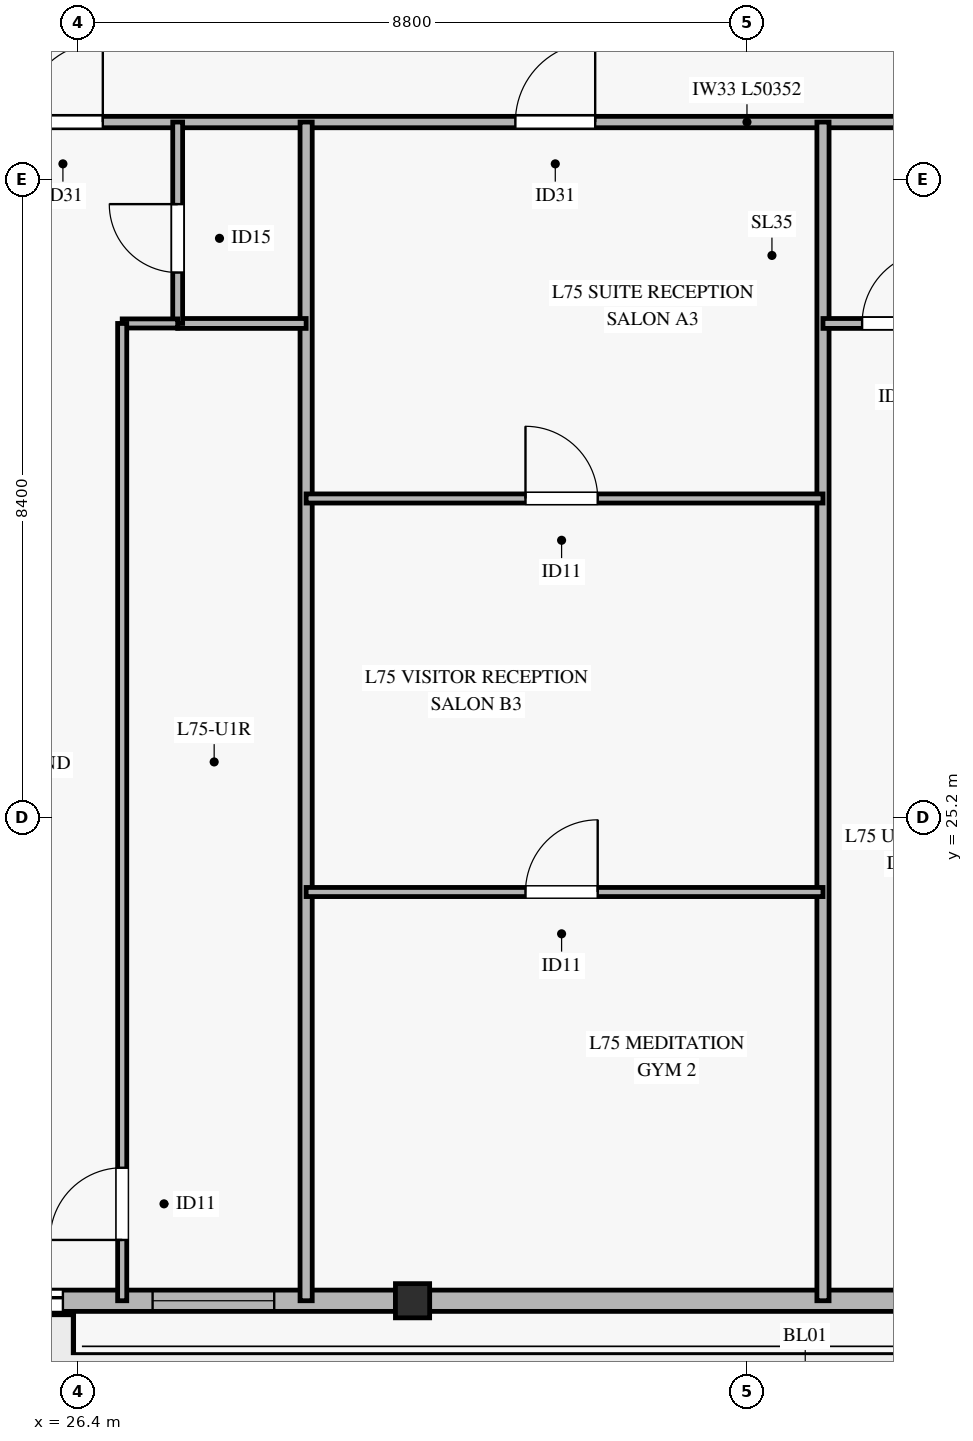
"""IFC4 building model, lengths in metres.
Left out: names, types, materials, properties, quantities, classifications, styles, units other than length and angle.
Written with IfcOpenShell. Run it as: python <this file> out.ifc"""

import sys

from ifc_helpers import new_model, si_unit, direction, frame, frame_2d, origin, origin_2d, place, context, subcontext, project, spatial, rectangle, hollow_rectangle, extrude, source, transform, mapped, element, fill, save


model = new_model("IFC4")
c1 = context("Model", 3, precision=1e-05, world=origin(), true_north=direction((0.0, 1.0)))
c2 = subcontext(c1, "Body", "Model", "MODEL_VIEW")
j1 = project(units=[si_unit("LENGTHUNIT", "METRE"), si_unit("PLANEANGLEUNIT", "RADIAN")], contexts=[c1])
p1 = place(None, origin())
s1 = spatial("IfcSite", under=j1, at=p1, CompositionType="ELEMENT")
p2 = place(p1, origin())
s2 = spatial("IfcBuilding", under=s1, at=p2, CompositionType="ELEMENT")
p3 = place(p2, frame((0.0, 0.0, 293.8)))
s3 = spatial("IfcBuildingStorey", under=s2, at=p3, CompositionType="ELEMENT", Elevation=293.8)
m1 = source(origin(), c2, "Body", "SweptSolid", [
    extrude(hollow_rectangle(XDim=0.45, YDim=0.45, WallThickness=0.022, at=origin_2d()), origin(), (0.0, 0.0, 1.0), 3.185),
])
p4 = place(p3, frame((30.8, 18.841, 0.0), z_axis=(0.0, 0.0, 1.0), x_axis=(1.0, 0.0, 0.0)))
e1 = element("IfcColumn", 1, at=p4, inside=s3, PredefinedType="COLUMN", context=c2, shape_type="MappedRepresentation", body=[
    mapped(m1, transform((0.0, 0.0, 0.0), x_axis=(1.0, 0.0, 0.0), y_axis=(0.0, 1.0, 0.0), z_axis=(0.0, 0.0, 1.0), scale=1.0)),
])
p5 = place(p3, frame((20.075, 18.841, 0.0), z_axis=(0.0, 0.0, 1.0), x_axis=(1.0, 0.0, 0.0)))
e2 = element("IfcWall", 2, at=p5, inside=s3, PredefinedType="SOLIDWALL", context=c2, shape_type="SweptSolid", body=[
    extrude(rectangle(XDim=10.5, YDim=0.28, at=frame_2d((5.25, 0.0))), origin(), (0.0, 0.0, 1.0), 2.815),
])
p6 = place(p5, frame((4.325, 0.0, 0.0)))
e3 = element("IfcOpeningElement", 3, at=p6, cuts=e2, PredefinedType="OPENING", context=c2, shape_type="SweptSolid", body=[
    extrude(rectangle(XDim=1.8, YDim=2.25, at=frame_2d((0.9, 1.125))), frame((0.0, 0.15, 0.0), z_axis=(0.0, -1.0, 0.0), x_axis=(1.0, 0.0, 0.0)), (0.0, 0.0, 1.0), 0.3),
])
p7 = place(p5, frame((0.517, 0.0, 0.45)))
e4 = element("IfcOpeningElement", 4, at=p7, cuts=e2, PredefinedType="OPENING", context=c2, shape_type="SweptSolid", body=[
    extrude(rectangle(XDim=1.6, YDim=2.0, at=frame_2d((0.8, 1.0))), frame((0.0, 0.15, 0.0), z_axis=(0.0, -1.0, 0.0), x_axis=(1.0, 0.0, 0.0)), (0.0, 0.0, 1.0), 0.3),
])
p8 = place(p5, frame((7.305, 0.0, 0.45)))
e5 = element("IfcOpeningElement", 5, at=p8, cuts=e2, PredefinedType="OPENING", context=c2, shape_type="SweptSolid", body=[
    extrude(rectangle(XDim=1.6, YDim=2.0, at=frame_2d((0.8, 1.0))), frame((0.0, 0.15, 0.0), z_axis=(0.0, -1.0, 0.0), x_axis=(1.0, 0.0, 0.0)), (0.0, 0.0, 1.0), 0.3),
])
p9 = place(p3, frame((31.025, 18.841, 0.0), z_axis=(0.0, 0.0, 1.0), x_axis=(1.0, 0.0, 0.0)))
e6 = element("IfcWall", 6, at=p9, inside=s3, PredefinedType="SOLIDWALL", context=c2, shape_type="SweptSolid", body=[
    extrude(rectangle(XDim=6.3, YDim=0.28, at=frame_2d((3.15, 0.0))), origin(), (0.0, 0.0, 1.0), 2.815),
])
p10 = place(p3, frame((10.024, 34.35, 0.0), z_axis=(0.0, 0.0, 1.0), x_axis=(1.0, 0.0, 0.0)))
e7 = element("IfcWall", 7, at=p10, inside=s3, PredefinedType="PARTITIONING", context=c2, shape_type="SweptSolid", body=[
    extrude(rectangle(XDim=50.352, YDim=0.15, at=frame_2d((25.176, 0.0))), origin(), (0.0, 0.0, 1.0), 2.47),
])
p11 = place(p10, frame((5.148, 0.0, 0.0)))
e8 = element("IfcOpeningElement", 8, at=p11, cuts=e7, PredefinedType="OPENING", context=c2, shape_type="SweptSolid", body=[
    extrude(rectangle(XDim=1.05, YDim=2.15, at=frame_2d((0.525, 1.075))), frame((0.0, 0.085, 0.0), z_axis=(0.0, -1.0, 0.0), x_axis=(1.0, 0.0, 0.0)), (0.0, 0.0, 1.0), 0.17),
])
p12 = place(p10, frame((15.651, 0.0, 0.0)))
e9 = element("IfcOpeningElement", 9, at=p12, cuts=e7, PredefinedType="OPENING", context=c2, shape_type="SweptSolid", body=[
    extrude(rectangle(XDim=1.05, YDim=2.15, at=frame_2d((0.525, 1.075))), frame((0.0, 0.085, 0.0), z_axis=(0.0, -1.0, 0.0), x_axis=(1.0, 0.0, 0.0)), (0.0, 0.0, 1.0), 0.17),
])
p13 = place(p10, frame((22.129, 0.0, 0.0)))
e10 = element("IfcOpeningElement", 10, at=p13, cuts=e7, PredefinedType="OPENING", context=c2, shape_type="SweptSolid", body=[
    extrude(rectangle(XDim=1.05, YDim=2.15, at=frame_2d((0.525, 1.075))), frame((0.0, 0.085, 0.0), z_axis=(0.0, -1.0, 0.0), x_axis=(1.0, 0.0, 0.0)), (0.0, 0.0, 1.0), 0.17),
])
p14 = place(p10, frame((29.151, 0.0, 0.0)))
e11 = element("IfcOpeningElement", 11, at=p14, cuts=e7, PredefinedType="OPENING", context=c2, shape_type="SweptSolid", body=[
    extrude(rectangle(XDim=1.05, YDim=2.15, at=frame_2d((0.525, 1.075))), frame((0.0, 0.085, 0.0), z_axis=(0.0, -1.0, 0.0), x_axis=(1.0, 0.0, 0.0)), (0.0, 0.0, 1.0), 0.17),
])
p15 = place(p10, frame((35.701, 0.0, 0.0)))
e12 = element("IfcOpeningElement", 12, at=p15, cuts=e7, PredefinedType="OPENING", context=c2, shape_type="SweptSolid", body=[
    extrude(rectangle(XDim=1.05, YDim=2.15, at=frame_2d((0.525, 1.075))), frame((0.0, 0.085, 0.0), z_axis=(0.0, -1.0, 0.0), x_axis=(1.0, 0.0, 0.0)), (0.0, 0.0, 1.0), 0.17),
])
p16 = place(p10, frame((43.578, 0.0, 0.0)))
e13 = element("IfcOpeningElement", 13, at=p16, cuts=e7, PredefinedType="OPENING", context=c2, shape_type="SweptSolid", body=[
    extrude(rectangle(XDim=1.05, YDim=2.15, at=frame_2d((0.525, 1.075))), frame((0.0, 0.085, 0.0), z_axis=(0.0, -1.0, 0.0), x_axis=(1.0, 0.0, 0.0)), (0.0, 0.0, 1.0), 0.17),
])
for number, where, z_axis, x_axis in (
    (14, (29.4, 18.841, 0.0), (0.0, 0.0, 1.0), (0.0, 1.0, 0.0)),
    (15, (36.2, 18.841, 0.0), (0.0, 0.0, 1.0), (0.0, 1.0, 0.0)),
):
    element("IfcWall", number, at=place(p3, frame(where, z_axis=z_axis, x_axis=x_axis)), inside=s3, PredefinedType="PARTITIONING", context=c2, shape_type="SweptSolid", body=[
        extrude(rectangle(XDim=15.509, YDim=0.16, at=frame_2d((7.754, 0.0))), origin(), (0.0, 0.0, 1.0), 2.77),
    ])
p17 = place(p3, frame((27.71, 31.7, 0.0), z_axis=(0.0, 0.0, 1.0), x_axis=(1.0, 0.0, 0.0)))
e16 = element("IfcWall", 16, at=p17, inside=s3, PredefinedType="PARTITIONING", context=c2, shape_type="SweptSolid", body=[
    extrude(rectangle(XDim=1.69, YDim=0.13, at=frame_2d((0.845, 0.0))), origin(), (0.0, 0.0, 1.0), 3.185),
])
p18 = place(p3, frame((27.71, 31.7, 0.0), z_axis=(0.0, 0.0, 1.0), x_axis=(0.0, 1.0, 0.0)))
e17 = element("IfcWall", 17, at=p18, inside=s3, PredefinedType="PARTITIONING", context=c2, shape_type="SweptSolid", body=[
    extrude(rectangle(XDim=2.65, YDim=0.13, at=frame_2d((1.325, 0.0))), origin(), (0.0, 0.0, 1.0), 2.77),
])
p19 = place(p18, frame((0.67, 0.0, 0.0)))
e18 = element("IfcOpeningElement", 18, at=p19, cuts=e17, PredefinedType="OPENING", context=c2, shape_type="SweptSolid", body=[
    extrude(rectangle(XDim=0.9, YDim=2.1, at=frame_2d((0.45, 1.05))), frame((0.0, 0.075, 0.0), z_axis=(0.0, -1.0, 0.0), x_axis=(1.0, 0.0, 0.0)), (0.0, 0.0, 1.0), 0.15),
])
p20 = place(p3, frame((26.98, 31.7, 0.0), z_axis=(0.0, 0.0, 1.0), x_axis=(1.0, 0.0, 0.0)))
e19 = element("IfcWall", 19, at=p20, inside=s3, PredefinedType="PARTITIONING", context=c2, shape_type="SweptSolid", body=[
    extrude(rectangle(XDim=0.73, YDim=0.12, at=frame_2d((0.365, 0.0))), origin(), (0.0, 0.0, 1.0), 3.185),
])
p21 = place(p3, frame((26.98, 18.841, 0.0), z_axis=(0.0, 0.0, 1.0), x_axis=(0.0, 1.0, 0.0)))
e20 = element("IfcWall", 20, at=p21, inside=s3, PredefinedType="PARTITIONING", context=c2, shape_type="SweptSolid", body=[
    extrude(rectangle(XDim=12.859, YDim=0.12, at=frame_2d((6.429, 0.0))), origin(), (0.0, 0.0, 1.0), 2.77),
])
p22 = place(p21, frame((0.8, 0.0, 0.0)))
e21 = element("IfcOpeningElement", 21, at=p22, cuts=e20, PredefinedType="OPENING", context=c2, shape_type="SweptSolid", body=[
    extrude(rectangle(XDim=0.95, YDim=2.1, at=frame_2d((0.475, 1.05))), frame((0.0, 0.07, 0.0), z_axis=(0.0, -1.0, 0.0), x_axis=(1.0, 0.0, 0.0)), (0.0, 0.0, 1.0), 0.14),
])
p23 = place(p3, frame((29.4, 24.219, 0.0), z_axis=(0.0, 0.0, 1.0), x_axis=(1.0, 0.0, 0.0)))
e22 = element("IfcWall", 22, at=p23, inside=s3, PredefinedType="PARTITIONING", context=c2, shape_type="SweptSolid", body=[
    extrude(rectangle(XDim=6.8, YDim=0.12, at=frame_2d((3.4, 0.0))), origin(), (0.0, 0.0, 1.0), 2.47),
])
p24 = place(p23, frame((2.886, 0.0, 0.0)))
e23 = element("IfcOpeningElement", 23, at=p24, cuts=e22, PredefinedType="OPENING", context=c2, shape_type="SweptSolid", body=[
    extrude(rectangle(XDim=0.95, YDim=2.1, at=frame_2d((0.475, 1.05))), frame((0.0, 0.07, 0.0), z_axis=(0.0, -1.0, 0.0), x_axis=(1.0, 0.0, 0.0)), (0.0, 0.0, 1.0), 0.14),
])
p25 = place(p3, frame((29.4, 29.397, 0.0), z_axis=(0.0, 0.0, 1.0), x_axis=(1.0, 0.0, 0.0)))
e24 = element("IfcWall", 24, at=p25, inside=s3, PredefinedType="PARTITIONING", context=c2, shape_type="SweptSolid", body=[
    extrude(rectangle(XDim=6.8, YDim=0.12, at=frame_2d((3.4, 0.0))), origin(), (0.0, 0.0, 1.0), 2.47),
])
p26 = place(p25, frame((2.886, 0.0, 0.0)))
e25 = element("IfcOpeningElement", 25, at=p26, cuts=e24, PredefinedType="OPENING", context=c2, shape_type="SweptSolid", body=[
    extrude(rectangle(XDim=0.95, YDim=2.1, at=frame_2d((0.475, 1.05))), frame((0.0, 0.07, 0.0), z_axis=(0.0, -1.0, 0.0), x_axis=(1.0, 0.0, 0.0)), (0.0, 0.0, 1.0), 0.14),
])
p27 = place(p3, frame((36.2, 31.7, 0.0), z_axis=(0.0, 0.0, 1.0), x_axis=(1.0, 0.0, 0.0)))
e26 = element("IfcWall", 26, at=p27, inside=s3, PredefinedType="PARTITIONING", context=c2, shape_type="SweptSolid", body=[
    extrude(rectangle(XDim=1.74, YDim=0.13, at=frame_2d((0.87, 0.0))), origin(), (0.0, 0.0, 1.0), 2.47),
])
p28 = place(p27, frame((0.515, 0.0, 0.0)))
e27 = element("IfcOpeningElement", 27, at=p28, cuts=e26, PredefinedType="OPENING", context=c2, shape_type="SweptSolid", body=[
    extrude(rectangle(XDim=0.95, YDim=2.1, at=frame_2d((0.475, 1.05))), frame((0.0, 0.075, 0.0), z_axis=(0.0, -1.0, 0.0), x_axis=(1.0, 0.0, 0.0)), (0.0, 0.0, 1.0), 0.15),
])
m2 = source(origin(), c2, "Body", "SweptSolid", [
    extrude(rectangle(XDim=1.8, YDim=2.25, at=frame_2d((0.9, 1.125))), frame((0.0, 0.025, 0.0), z_axis=(0.0, -1.0, 0.0), x_axis=(1.0, 0.0, 0.0)), (0.0, 0.0, 1.0), 0.05),
])
p29 = place(p6, origin())
e28 = element("IfcDoor", 28, at=p29, inside=s3, OperationType="SLIDING_TO_LEFT", PredefinedType="DOOR", context=c2, shape_type="MappedRepresentation", body=[
    mapped(m2, transform((0.0, 0.0, 0.0), x_axis=(1.0, 0.0, 0.0), y_axis=(0.0, 1.0, 0.0), z_axis=(0.0, 0.0, 1.0), scale=1.0)),
])
fill(e3, e28)
m3 = source(origin(), c2, "Body", "SweptSolid", [
    extrude(rectangle(XDim=1.6, YDim=2.0, at=frame_2d((0.8, 1.0))), frame((0.0, 0.03, 0.0), z_axis=(0.0, -1.0, 0.0), x_axis=(1.0, 0.0, 0.0)), (0.0, 0.0, 1.0), 0.06),
])
p30 = place(p8, origin())
e29 = element("IfcWindow", 29, at=p30, inside=s3, PartitioningType="SINGLE_PANEL", PredefinedType="WINDOW", context=c2, shape_type="MappedRepresentation", body=[
    mapped(m3, transform((0.0, 0.0, 0.0), x_axis=(1.0, 0.0, 0.0), y_axis=(0.0, 1.0, 0.0), z_axis=(0.0, 0.0, 1.0), scale=1.0)),
])
fill(e5, e29)
m4 = source(origin(), c2, "Body", "SweptSolid", [
    extrude(rectangle(XDim=1.05, YDim=2.15, at=frame_2d((0.525, 1.075))), frame((0.0, 0.025, 0.0), z_axis=(0.0, -1.0, 0.0), x_axis=(1.0, 0.0, 0.0)), (0.0, 0.0, 1.0), 0.05),
])
p31 = place(p12, origin())
e30 = element("IfcDoor", 30, at=p31, inside=s3, OperationType="SINGLE_SWING_RIGHT", PredefinedType="DOOR", context=c2, shape_type="MappedRepresentation", body=[
    mapped(m4, transform((0.0, 0.0, 0.0), x_axis=(1.0, 0.0, 0.0), y_axis=(0.0, 1.0, 0.0), z_axis=(0.0, 0.0, 1.0), scale=1.0)),
])
fill(e9, e30)
m5 = source(origin(), c2, "Body", "SweptSolid", [
    extrude(rectangle(XDim=0.9, YDim=2.1, at=frame_2d((0.45, 1.05))), frame((0.0, 0.025, 0.0), z_axis=(0.0, -1.0, 0.0), x_axis=(1.0, 0.0, 0.0)), (0.0, 0.0, 1.0), 0.05),
])
p32 = place(p19, origin())
e31 = element("IfcDoor", 31, at=p32, inside=s3, OperationType="SINGLE_SWING_RIGHT", PredefinedType="DOOR", context=c2, shape_type="MappedRepresentation", body=[
    mapped(m5, transform((0.0, 0.0, 0.0), x_axis=(1.0, 0.0, 0.0), y_axis=(0.0, 1.0, 0.0), z_axis=(0.0, 0.0, 1.0), scale=1.0)),
])
fill(e18, e31)
m6 = source(origin(), c2, "Body", "SweptSolid", [
    extrude(rectangle(XDim=0.95, YDim=2.1, at=frame_2d((0.475, 1.05))), frame((0.0, 0.025, 0.0), z_axis=(0.0, -1.0, 0.0), x_axis=(1.0, 0.0, 0.0)), (0.0, 0.0, 1.0), 0.05),
])
p33 = place(p22, origin())
e32 = element("IfcDoor", 32, at=p33, inside=s3, OperationType="SINGLE_SWING_LEFT", PredefinedType="DOOR", context=c2, shape_type="MappedRepresentation", body=[
    mapped(m6, transform((0.0, 0.0, 0.0), x_axis=(1.0, 0.0, 0.0), y_axis=(0.0, 1.0, 0.0), z_axis=(0.0, 0.0, 1.0), scale=1.0)),
])
fill(e21, e32)
p34 = place(p13, origin())
e33 = element("IfcDoor", 33, at=p34, inside=s3, OperationType="SINGLE_SWING_RIGHT", PredefinedType="DOOR", context=c2, shape_type="MappedRepresentation", body=[
    mapped(m4, transform((0.0, 0.0, 0.0), x_axis=(1.0, 0.0, 0.0), y_axis=(0.0, 1.0, 0.0), z_axis=(0.0, 0.0, 1.0), scale=1.0)),
])
fill(e10, e33)
p35 = place(p26, origin())
e34 = element("IfcDoor", 34, at=p35, inside=s3, OperationType="SINGLE_SWING_LEFT", PredefinedType="DOOR", context=c2, shape_type="MappedRepresentation", body=[
    mapped(m6, transform((0.0, 0.0, 0.0), x_axis=(1.0, 0.0, 0.0), y_axis=(0.0, 1.0, 0.0), z_axis=(0.0, 0.0, 1.0), scale=1.0)),
])
fill(e25, e34)
p36 = place(p24, origin())
e35 = element("IfcDoor", 35, at=p36, inside=s3, OperationType="SINGLE_SWING_RIGHT", PredefinedType="DOOR", context=c2, shape_type="MappedRepresentation", body=[
    mapped(m6, transform((0.0, 0.0, 0.0), x_axis=(1.0, 0.0, 0.0), y_axis=(0.0, 1.0, 0.0), z_axis=(0.0, 0.0, 1.0), scale=1.0)),
])
fill(e23, e35)
p37 = place(p28, origin())
e36 = element("IfcDoor", 36, at=p37, inside=s3, OperationType="SINGLE_SWING_RIGHT", PredefinedType="DOOR", context=c2, shape_type="MappedRepresentation", body=[
    mapped(m6, transform((0.0, 0.0, 0.0), x_axis=(1.0, 0.0, 0.0), y_axis=(0.0, 1.0, 0.0), z_axis=(0.0, 0.0, 1.0), scale=1.0)),
])
fill(e27, e36)
save(model, sys.argv[1])
